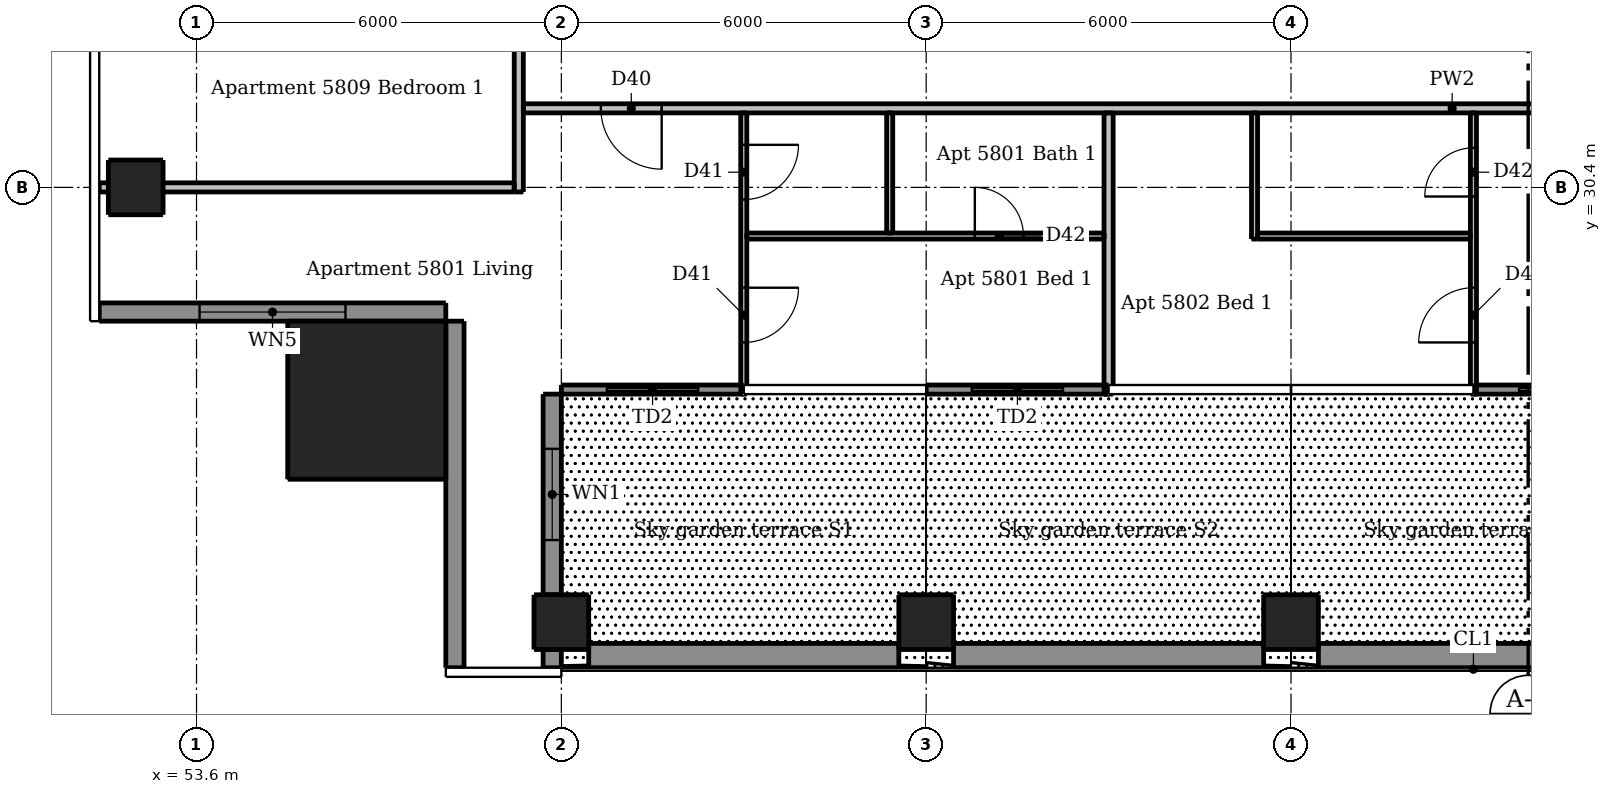
"""IFC4 building model, lengths in metres.
Left out: names, types, materials, properties, quantities, classifications, styles, units other than length and angle.
Written with IfcOpenShell. Run it as: python <this file> out.ifc"""

import sys

from ifc_helpers import new_model, si_unit, direction, frame, frame_2d, origin, origin_2d, place, context, subcontext, project, spatial, rectangle, extrude, element, fill, save


model = new_model("IFC4")
c1 = context("Model", 3, precision=1e-05, world=origin(), true_north=direction((0.0, 1.0)))
c2 = subcontext(c1, "Body", "Model", "MODEL_VIEW")
j1 = project(units=[si_unit("LENGTHUNIT", "METRE"), si_unit("PLANEANGLEUNIT", "RADIAN")], contexts=[c1])
p1 = place(None, origin())
s1 = spatial("IfcSite", under=j1, at=p1, CompositionType="ELEMENT")
p2 = place(p1, origin())
s2 = spatial("IfcBuilding", under=s1, at=p2, CompositionType="ELEMENT")
p3 = place(p2, frame((0.0, 0.0, 216.7)))
s3 = spatial("IfcBuildingStorey", under=s2, at=p3, CompositionType="ELEMENT", Elevation=216.7)
p4 = place(p3, frame((59.6, 23.25, 0.0), z_axis=(0.0, 0.0, 1.0), x_axis=(1.0, 0.0, 0.0)))
e1 = element("IfcColumn", 1, at=p4, inside=s3, PredefinedType="COLUMN", context=c2, shape_type="SweptSolid", body=[
    extrude(rectangle(XDim=0.9, YDim=0.9, at=origin_2d()), origin(), (0.0, 0.0, 1.0), 3.05),
])
for number, where, z_axis, x_axis in (
    (2, (65.6, 23.25, 0.0), (0.0, 0.0, 1.0), (1.0, 0.0, 0.0)),
    (3, (71.6, 23.25, 0.0), (0.0, 0.0, 1.0), (1.0, 0.0, 0.0)),
):
    element("IfcColumn", number, at=place(p3, frame(where, z_axis=z_axis, x_axis=x_axis)), inside=s3, PredefinedType="COLUMN", context=c2, shape_type="SweptSolid", body=[
        extrude(rectangle(XDim=0.9, YDim=0.9, at=origin_2d()), origin(), (0.0, 0.0, 1.0), 3.3),
    ])
p5 = place(p3, frame((52.6, 30.4, 0.0), z_axis=(0.0, 0.0, 1.0), x_axis=(1.0, 0.0, 0.0)))
e4 = element("IfcColumn", 4, at=p5, inside=s3, PredefinedType="COLUMN", context=c2, shape_type="SweptSolid", body=[
    extrude(rectangle(XDim=0.9, YDim=0.9, at=origin_2d()), origin(), (0.0, 0.0, 1.0), 3.05),
])
p6 = place(p3, frame((56.4, 26.9, 0.0), z_axis=(0.0, 0.0, 1.0), x_axis=(1.0, 0.0, 0.0)))
e5 = element("IfcColumn", 5, at=p6, inside=s3, PredefinedType="COLUMN", context=c2, shape_type="SweptSolid", body=[
    extrude(rectangle(XDim=2.6, YDim=2.6, at=origin_2d()), origin(), (0.0, 0.0, 1.0), 3.3),
])
p7 = place(p3, frame((59.45, 22.5, 0.0), z_axis=(0.0, 0.0, 1.0), x_axis=(0.0, 1.0, 0.0)))
e6 = element("IfcWall", 6, at=p7, inside=s3, PredefinedType="SOLIDWALL", context=c2, shape_type="SweptSolid", body=[
    extrude(rectangle(XDim=0.3, YDim=0.3, at=frame_2d((0.15, 0.0))), origin(), (0.0, 0.0, 1.0), 3.05),
])
p8 = place(p3, frame((59.45, 23.7, 0.0), z_axis=(0.0, 0.0, 1.0), x_axis=(0.0, 1.0, 0.0)))
e7 = element("IfcWall", 7, at=p8, inside=s3, PredefinedType="SOLIDWALL", context=c2, shape_type="SweptSolid", body=[
    extrude(rectangle(XDim=3.3, YDim=0.3, at=frame_2d((1.65, 0.0))), origin(), (0.0, 0.0, 1.0), 3.05),
])
p9 = place(p8, frame((0.9, 0.0, 0.9)))
e8 = element("IfcOpeningElement", 8, at=p9, cuts=e7, PredefinedType="OPENING", context=c2, shape_type="SweptSolid", body=[
    extrude(rectangle(XDim=1.5, YDim=1.5, at=frame_2d((0.75, 0.75))), frame((0.0, 0.16, 0.0), z_axis=(0.0, -1.0, 0.0), x_axis=(1.0, 0.0, 0.0)), (0.0, 0.0, 1.0), 0.32),
])
p10 = place(p3, frame((52.0, 28.35, 0.0), z_axis=(0.0, 0.0, 1.0), x_axis=(1.0, 0.0, 0.0)))
e9 = element("IfcWall", 9, at=p10, inside=s3, PredefinedType="SOLIDWALL", context=c2, shape_type="SweptSolid", body=[
    extrude(rectangle(XDim=5.7, YDim=0.3, at=frame_2d((2.85, 0.0))), origin(), (0.0, 0.0, 1.0), 3.05),
])
p11 = place(p10, frame((1.65, 0.0, 0.15)))
e10 = element("IfcOpeningElement", 10, at=p11, cuts=e9, PredefinedType="OPENING", context=c2, shape_type="SweptSolid", body=[
    extrude(rectangle(XDim=2.4, YDim=2.1, at=frame_2d((1.2, 1.05))), frame((0.0, 0.16, 0.0), z_axis=(0.0, -1.0, 0.0), x_axis=(1.0, 0.0, 0.0)), (0.0, 0.0, 1.0), 0.32),
])
p12 = place(p3, frame((57.85, 28.2, 0.0), z_axis=(0.0, 0.0, 1.0), x_axis=(0.0, -1.0, 0.0)))
e11 = element("IfcWall", 11, at=p12, inside=s3, PredefinedType="SOLIDWALL", context=c2, shape_type="SweptSolid", body=[
    extrude(rectangle(XDim=5.7, YDim=0.3, at=frame_2d((2.85, 0.0))), origin(), (0.0, 0.0, 1.0), 3.05),
])
p13 = place(p3, frame((59.6, 27.075, 0.0), z_axis=(0.0, 0.0, 1.0), x_axis=(1.0, 0.0, 0.0)))
e12 = element("IfcWall", 12, at=p13, inside=s3, PredefinedType="SOLIDWALL", context=c2, shape_type="SweptSolid", body=[
    extrude(rectangle(XDim=3.0, YDim=0.15, at=frame_2d((1.5, 0.0))), origin(), (0.0, 0.0, 1.0), 3.05),
])
p14 = place(p13, frame((0.75, 0.0, 0.0)))
e13 = element("IfcOpeningElement", 13, at=p14, cuts=e12, PredefinedType="OPENING", context=c2, shape_type="SweptSolid", body=[
    extrude(rectangle(XDim=1.5, YDim=2.4, at=frame_2d((0.75, 1.2))), frame((0.0, 0.085, 0.0), z_axis=(0.0, -1.0, 0.0), x_axis=(1.0, 0.0, 0.0)), (0.0, 0.0, 1.0), 0.17),
])
p15 = place(p3, frame((65.6, 27.075, 0.0), z_axis=(0.0, 0.0, 1.0), x_axis=(1.0, 0.0, 0.0)))
e14 = element("IfcWall", 14, at=p15, inside=s3, PredefinedType="SOLIDWALL", context=c2, shape_type="SweptSolid", body=[
    extrude(rectangle(XDim=3.0, YDim=0.15, at=frame_2d((1.5, 0.0))), origin(), (0.0, 0.0, 1.0), 3.05),
])
p16 = place(p15, frame((0.75, 0.0, 0.0)))
e15 = element("IfcOpeningElement", 15, at=p16, cuts=e14, PredefinedType="OPENING", context=c2, shape_type="SweptSolid", body=[
    extrude(rectangle(XDim=1.5, YDim=2.4, at=frame_2d((0.75, 1.2))), frame((0.0, 0.085, 0.0), z_axis=(0.0, -1.0, 0.0), x_axis=(1.0, 0.0, 0.0)), (0.0, 0.0, 1.0), 0.17),
])
p17 = place(p3, frame((74.6, 27.075, 0.0), z_axis=(0.0, 0.0, 1.0), x_axis=(1.0, 0.0, 0.0)))
e16 = element("IfcWall", 16, at=p17, inside=s3, PredefinedType="SOLIDWALL", context=c2, shape_type="SweptSolid", body=[
    extrude(rectangle(XDim=3.0, YDim=0.15, at=frame_2d((1.5, 0.0))), origin(), (0.0, 0.0, 1.0), 3.05),
])
p18 = place(p17, frame((0.75, 0.0, 0.0)))
e17 = element("IfcOpeningElement", 17, at=p18, cuts=e16, PredefinedType="OPENING", context=c2, shape_type="SweptSolid", body=[
    extrude(rectangle(XDim=1.5, YDim=2.4, at=frame_2d((0.75, 1.2))), frame((0.0, 0.085, 0.0), z_axis=(0.0, -1.0, 0.0), x_axis=(1.0, 0.0, 0.0)), (0.0, 0.0, 1.0), 0.17),
])
for number, where, z_axis, x_axis in (
    (18, (60.05, 22.7, 0.03), (0.0, 0.0, 1.0), (1.0, 0.0, 0.0)),
    (19, (66.05, 22.7, 0.03), (0.0, 0.0, 1.0), (1.0, 0.0, 0.0)),
):
    element("IfcWall", number, at=place(p3, frame(where, z_axis=z_axis, x_axis=x_axis)), inside=s3, PredefinedType="PARAPET", context=c2, shape_type="SweptSolid", body=[
        extrude(rectangle(XDim=5.1, YDim=0.4, at=frame_2d((2.55, 0.0))), origin(), (0.0, 0.0, 1.0), 1.1),
    ])
p19 = place(p3, frame((72.05, 22.7, 0.03), z_axis=(0.0, 0.0, 1.0), x_axis=(1.0, 0.0, 0.0)))
e20 = element("IfcWall", 20, at=p19, inside=s3, PredefinedType="PARAPET", context=c2, shape_type="SweptSolid", body=[
    extrude(rectangle(XDim=5.55, YDim=0.4, at=frame_2d((2.775, 0.0))), origin(), (0.0, 0.0, 1.0), 1.1),
])
p20 = place(p3, frame((62.6, 31.625, 0.0), z_axis=(0.0, 0.0, 1.0), x_axis=(0.0, -1.0, 0.0)))
e21 = element("IfcWall", 21, at=p20, inside=s3, PredefinedType="PARTITIONING", context=c2, shape_type="SweptSolid", body=[
    extrude(rectangle(XDim=4.625, YDim=0.1, at=frame_2d((2.312, 0.0))), origin(), (0.0, 0.0, 1.0), 3.05),
])
p21 = place(p20, frame((0.525, 0.0, 0.0)))
e22 = element("IfcOpeningElement", 22, at=p21, cuts=e21, PredefinedType="OPENING", context=c2, shape_type="SweptSolid", body=[
    extrude(rectangle(XDim=0.9, YDim=2.1, at=frame_2d((0.45, 1.05))), frame((0.0, 0.06, 0.0), z_axis=(0.0, -1.0, 0.0), x_axis=(1.0, 0.0, 0.0)), (0.0, 0.0, 1.0), 0.12),
])
p22 = place(p20, frame((2.875, 0.0, 0.0)))
e23 = element("IfcOpeningElement", 23, at=p22, cuts=e21, PredefinedType="OPENING", context=c2, shape_type="SweptSolid", body=[
    extrude(rectangle(XDim=0.9, YDim=2.1, at=frame_2d((0.45, 1.05))), frame((0.0, 0.06, 0.0), z_axis=(0.0, -1.0, 0.0), x_axis=(1.0, 0.0, 0.0)), (0.0, 0.0, 1.0), 0.12),
])
p23 = place(p3, frame((65.0, 29.65, 0.0), z_axis=(0.0, 0.0, 1.0), x_axis=(0.0, 1.0, 0.0)))
e24 = element("IfcWall", 24, at=p23, inside=s3, PredefinedType="PARTITIONING", context=c2, shape_type="SweptSolid", body=[
    extrude(rectangle(XDim=1.975, YDim=0.1, at=frame_2d((0.988, 0.0))), origin(), (0.0, 0.0, 1.0), 3.05),
])
p24 = place(p3, frame((71.0, 29.55, 0.0), z_axis=(0.0, 0.0, 1.0), x_axis=(0.0, 1.0, 0.0)))
e25 = element("IfcWall", 25, at=p24, inside=s3, PredefinedType="PARTITIONING", context=c2, shape_type="SweptSolid", body=[
    extrude(rectangle(XDim=2.075, YDim=0.1, at=frame_2d((1.038, 0.0))), origin(), (0.0, 0.0, 1.0), 3.05),
])
p25 = place(p3, frame((74.6, 27.0, 0.0), z_axis=(0.0, 0.0, 1.0), x_axis=(0.0, 1.0, 0.0)))
e26 = element("IfcWall", 26, at=p25, inside=s3, PredefinedType="PARTITIONING", context=c2, shape_type="SweptSolid", body=[
    extrude(rectangle(XDim=4.625, YDim=0.1, at=frame_2d((2.312, 0.0))), origin(), (0.0, 0.0, 1.0), 3.05),
])
p26 = place(p25, frame((0.85, 0.0, 0.0)))
e27 = element("IfcOpeningElement", 27, at=p26, cuts=e26, PredefinedType="OPENING", context=c2, shape_type="SweptSolid", body=[
    extrude(rectangle(XDim=0.9, YDim=2.1, at=frame_2d((0.45, 1.05))), frame((0.0, 0.06, 0.0), z_axis=(0.0, -1.0, 0.0), x_axis=(1.0, 0.0, 0.0)), (0.0, 0.0, 1.0), 0.12),
])
p27 = place(p25, frame((3.25, 0.0, 0.0)))
e28 = element("IfcOpeningElement", 28, at=p27, cuts=e26, PredefinedType="OPENING", context=c2, shape_type="SweptSolid", body=[
    extrude(rectangle(XDim=0.8, YDim=2.1, at=frame_2d((0.4, 1.05))), frame((0.0, 0.06, 0.0), z_axis=(0.0, -1.0, 0.0), x_axis=(1.0, 0.0, 0.0)), (0.0, 0.0, 1.0), 0.12),
])
p28 = place(p3, frame((62.65, 29.6, 0.0), z_axis=(0.0, 0.0, 1.0), x_axis=(1.0, 0.0, 0.0)))
e29 = element("IfcWall", 29, at=p28, inside=s3, PredefinedType="PARTITIONING", context=c2, shape_type="SweptSolid", body=[
    extrude(rectangle(XDim=5.875, YDim=0.1, at=frame_2d((2.938, 0.0))), origin(), (0.0, 0.0, 1.0), 3.05),
])
p29 = place(p28, frame((3.75, 0.0, 0.0)))
e30 = element("IfcOpeningElement", 30, at=p29, cuts=e29, PredefinedType="OPENING", context=c2, shape_type="SweptSolid", body=[
    extrude(rectangle(XDim=0.8, YDim=2.1, at=frame_2d((0.4, 1.05))), frame((0.0, 0.06, 0.0), z_axis=(0.0, -1.0, 0.0), x_axis=(1.0, 0.0, 0.0)), (0.0, 0.0, 1.0), 0.12),
])
p30 = place(p3, frame((71.05, 29.6, 0.0), z_axis=(0.0, 0.0, 1.0), x_axis=(1.0, 0.0, 0.0)))
e31 = element("IfcWall", 31, at=p30, inside=s3, PredefinedType="PARTITIONING", context=c2, shape_type="SweptSolid", body=[
    extrude(rectangle(XDim=3.5, YDim=0.1, at=frame_2d((1.75, 0.0))), origin(), (0.0, 0.0, 1.0), 3.05),
])
p31 = place(p3, frame((58.9, 30.325, 0.0), z_axis=(0.0, 0.0, 1.0), x_axis=(0.0, 1.0, 0.0)))
e32 = element("IfcWall", 32, at=p31, inside=s3, PredefinedType="PARTITIONING", context=c2, shape_type="SweptSolid", body=[
    extrude(rectangle(XDim=30.85, YDim=0.15, at=frame_2d((15.425, 0.0))), origin(), (0.0, 0.0, 1.0), 3.05),
])
p32 = place(p31, frame((7.375, 0.0, 0.0)))
e33 = element("IfcOpeningElement", 33, at=p32, cuts=e32, PredefinedType="OPENING", context=c2, shape_type="SweptSolid", body=[
    extrude(rectangle(XDim=1.0, YDim=2.1, at=frame_2d((0.5, 1.05))), frame((0.0, 0.085, 0.0), z_axis=(0.0, -1.0, 0.0), x_axis=(1.0, 0.0, 0.0)), (0.0, 0.0, 1.0), 0.17),
])
p33 = place(p31, frame((26.925, 0.0, 0.0)))
e34 = element("IfcOpeningElement", 34, at=p33, cuts=e32, PredefinedType="OPENING", context=c2, shape_type="SweptSolid", body=[
    extrude(rectangle(XDim=1.0, YDim=2.1, at=frame_2d((0.5, 1.05))), frame((0.0, 0.085, 0.0), z_axis=(0.0, -1.0, 0.0), x_axis=(1.0, 0.0, 0.0)), (0.0, 0.0, 1.0), 0.17),
])
p34 = place(p3, frame((68.6, 27.0, 0.0), z_axis=(0.0, 0.0, 1.0), x_axis=(0.0, 1.0, 0.0)))
e35 = element("IfcWall", 35, at=p34, inside=s3, PredefinedType="PARTITIONING", context=c2, shape_type="SweptSolid", body=[
    extrude(rectangle(XDim=4.625, YDim=0.15, at=frame_2d((2.312, 0.0))), origin(), (0.0, 0.0, 1.0), 3.05),
])
p35 = place(p3, frame((89.525, 31.7, 0.0), z_axis=(0.0, 0.0, 1.0), x_axis=(-1.0, 0.0, 0.0)))
e36 = element("IfcWall", 36, at=p35, inside=s3, PredefinedType="PARTITIONING", context=c2, shape_type="SweptSolid", body=[
    extrude(rectangle(XDim=30.55, YDim=0.15, at=frame_2d((15.275, 0.0))), origin(), (0.0, 0.0, 1.0), 3.05),
])
p36 = place(p35, frame((28.275, 0.0, 0.0)))
e37 = element("IfcOpeningElement", 37, at=p36, cuts=e36, PredefinedType="OPENING", context=c2, shape_type="SweptSolid", body=[
    extrude(rectangle(XDim=1.0, YDim=2.1, at=frame_2d((0.5, 1.05))), frame((0.0, 0.085, 0.0), z_axis=(0.0, -1.0, 0.0), x_axis=(1.0, 0.0, 0.0)), (0.0, 0.0, 1.0), 0.17),
])
p37 = place(p35, frame((12.625, 0.0, 0.0)))
e38 = element("IfcOpeningElement", 38, at=p37, cuts=e36, PredefinedType="OPENING", context=c2, shape_type="SweptSolid", body=[
    extrude(rectangle(XDim=1.0, YDim=2.1, at=frame_2d((0.5, 1.05))), frame((0.0, 0.085, 0.0), z_axis=(0.0, -1.0, 0.0), x_axis=(1.0, 0.0, 0.0)), (0.0, 0.0, 1.0), 0.17),
])
p38 = place(p35, frame((2.425, 0.0, 0.0)))
e39 = element("IfcOpeningElement", 39, at=p38, cuts=e36, PredefinedType="OPENING", context=c2, shape_type="SweptSolid", body=[
    extrude(rectangle(XDim=1.0, YDim=2.1, at=frame_2d((0.5, 1.05))), frame((0.0, 0.085, 0.0), z_axis=(0.0, -1.0, 0.0), x_axis=(1.0, 0.0, 0.0)), (0.0, 0.0, 1.0), 0.17),
])
p39 = place(p3, frame((52.0, 30.4, 0.0), z_axis=(0.0, 0.0, 1.0), x_axis=(1.0, 0.0, 0.0)))
e40 = element("IfcWall", 40, at=p39, inside=s3, PredefinedType="PARTITIONING", context=c2, shape_type="SweptSolid", body=[
    extrude(rectangle(XDim=6.825, YDim=0.15, at=frame_2d((3.413, 0.0))), origin(), (0.0, 0.0, 1.0), 2.647),
])
p40 = place(p9, origin())
e41 = element("IfcWindow", 41, at=p40, inside=s3, PartitioningType="DOUBLE_PANEL_VERTICAL", PredefinedType="WINDOW", context=c2, shape_type="SweptSolid", body=[
    extrude(rectangle(XDim=1.5, YDim=1.5, at=frame_2d((0.75, 0.75))), frame((0.0, 0.03, 0.0), z_axis=(0.0, -1.0, 0.0), x_axis=(1.0, 0.0, 0.0)), (0.0, 0.0, 1.0), 0.06),
])
fill(e8, e41)
p41 = place(p11, origin())
e42 = element("IfcWindow", 42, at=p41, inside=s3, PartitioningType="DOUBLE_PANEL_VERTICAL", PredefinedType="WINDOW", context=c2, shape_type="SweptSolid", body=[
    extrude(rectangle(XDim=2.4, YDim=2.1, at=frame_2d((1.2, 1.05))), frame((0.0, 0.03, 0.0), z_axis=(0.0, -1.0, 0.0), x_axis=(1.0, 0.0, 0.0)), (0.0, 0.0, 1.0), 0.06),
])
fill(e10, e42)
p42 = place(p14, origin())
e43 = element("IfcDoor", 43, at=p42, inside=s3, OperationType="DOUBLE_DOOR_SLIDING", PredefinedType="DOOR", context=c2, shape_type="SweptSolid", body=[
    extrude(rectangle(XDim=1.5, YDim=2.4, at=frame_2d((0.75, 1.2))), frame((0.0, 0.025, 0.0), z_axis=(0.0, -1.0, 0.0), x_axis=(1.0, 0.0, 0.0)), (0.0, 0.0, 1.0), 0.05),
])
fill(e13, e43)
p43 = place(p16, origin())
e44 = element("IfcDoor", 44, at=p43, inside=s3, OperationType="DOUBLE_DOOR_SLIDING", PredefinedType="DOOR", context=c2, shape_type="SweptSolid", body=[
    extrude(rectangle(XDim=1.5, YDim=2.4, at=frame_2d((0.75, 1.2))), frame((0.0, 0.025, 0.0), z_axis=(0.0, -1.0, 0.0), x_axis=(1.0, 0.0, 0.0)), (0.0, 0.0, 1.0), 0.05),
])
fill(e15, e44)
p44 = place(p18, origin())
e45 = element("IfcDoor", 45, at=p44, inside=s3, OperationType="DOUBLE_DOOR_SLIDING", PredefinedType="DOOR", context=c2, shape_type="SweptSolid", body=[
    extrude(rectangle(XDim=1.5, YDim=2.4, at=frame_2d((0.75, 1.2))), frame((0.0, 0.025, 0.0), z_axis=(0.0, -1.0, 0.0), x_axis=(1.0, 0.0, 0.0)), (0.0, 0.0, 1.0), 0.05),
])
fill(e17, e45)
p45 = place(p36, origin())
e46 = element("IfcDoor", 46, at=p45, inside=s3, OperationType="SINGLE_SWING_LEFT", PredefinedType="DOOR", context=c2, shape_type="SweptSolid", body=[
    extrude(rectangle(XDim=1.0, YDim=2.1, at=frame_2d((0.5, 1.05))), frame((0.0, 0.025, 0.0), z_axis=(0.0, -1.0, 0.0), x_axis=(1.0, 0.0, 0.0)), (0.0, 0.0, 1.0), 0.05),
])
fill(e37, e46)
p46 = place(p21, origin())
e47 = element("IfcDoor", 47, at=p46, inside=s3, OperationType="SINGLE_SWING_LEFT", PredefinedType="DOOR", context=c2, shape_type="SweptSolid", body=[
    extrude(rectangle(XDim=0.9, YDim=2.1, at=frame_2d((0.45, 1.05))), frame((0.0, 0.025, 0.0), z_axis=(0.0, -1.0, 0.0), x_axis=(1.0, 0.0, 0.0)), (0.0, 0.0, 1.0), 0.05),
])
fill(e22, e47)
p47 = place(p22, origin())
e48 = element("IfcDoor", 48, at=p47, inside=s3, OperationType="SINGLE_SWING_LEFT", PredefinedType="DOOR", context=c2, shape_type="SweptSolid", body=[
    extrude(rectangle(XDim=0.9, YDim=2.1, at=frame_2d((0.45, 1.05))), frame((0.0, 0.025, 0.0), z_axis=(0.0, -1.0, 0.0), x_axis=(1.0, 0.0, 0.0)), (0.0, 0.0, 1.0), 0.05),
])
fill(e23, e48)
p48 = place(p29, origin())
e49 = element("IfcDoor", 49, at=p48, inside=s3, OperationType="SINGLE_SWING_LEFT", PredefinedType="DOOR", context=c2, shape_type="SweptSolid", body=[
    extrude(rectangle(XDim=0.8, YDim=2.1, at=frame_2d((0.4, 1.05))), frame((0.0, 0.025, 0.0), z_axis=(0.0, -1.0, 0.0), x_axis=(1.0, 0.0, 0.0)), (0.0, 0.0, 1.0), 0.05),
])
fill(e30, e49)
p49 = place(p26, origin())
e50 = element("IfcDoor", 50, at=p49, inside=s3, OperationType="SINGLE_SWING_LEFT", PredefinedType="DOOR", context=c2, shape_type="SweptSolid", body=[
    extrude(rectangle(XDim=0.9, YDim=2.1, at=frame_2d((0.45, 1.05))), frame((0.0, 0.025, 0.0), z_axis=(0.0, -1.0, 0.0), x_axis=(1.0, 0.0, 0.0)), (0.0, 0.0, 1.0), 0.05),
])
fill(e27, e50)
p50 = place(p27, origin())
e51 = element("IfcDoor", 51, at=p50, inside=s3, OperationType="SINGLE_SWING_LEFT", PredefinedType="DOOR", context=c2, shape_type="SweptSolid", body=[
    extrude(rectangle(XDim=0.8, YDim=2.1, at=frame_2d((0.4, 1.05))), frame((0.0, 0.025, 0.0), z_axis=(0.0, -1.0, 0.0), x_axis=(1.0, 0.0, 0.0)), (0.0, 0.0, 1.0), 0.05),
])
fill(e28, e51)
save(model, sys.argv[1])
